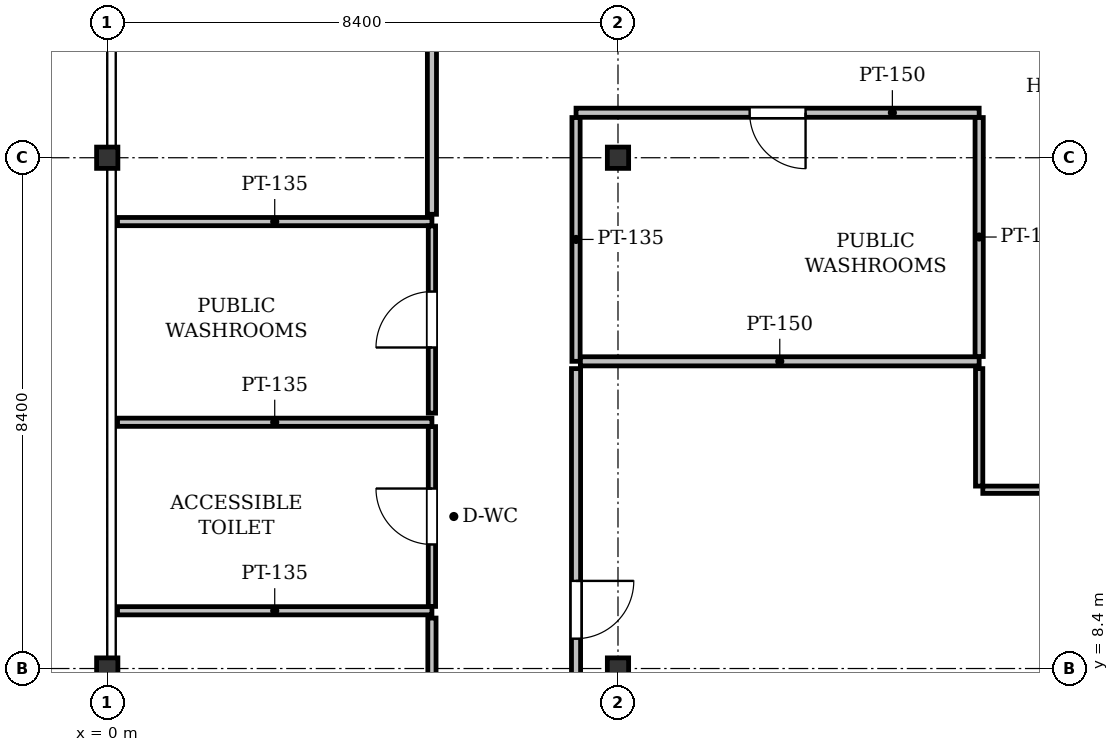
"""IFC4 building model, lengths in metres.
Left out: names, types, materials, properties, quantities, classifications, styles, units other than length and angle.
Written with IfcOpenShell. Run it as: python <this file> out.ifc"""

import sys

from ifc_helpers import new_model, si_unit, direction, frame, frame_2d, origin, origin_2d, place, context, subcontext, project, spatial, rectangle, i_section, extrude, element, fill, save


model = new_model("IFC4")
c1 = context("Model", 3, precision=1e-05, world=origin(), true_north=direction((0.0, 1.0)))
c2 = subcontext(c1, "Body", "Model", "MODEL_VIEW")
j1 = project(units=[si_unit("LENGTHUNIT", "METRE"), si_unit("PLANEANGLEUNIT", "RADIAN")], contexts=[c1])
p1 = place(None, origin())
s1 = spatial("IfcSite", under=j1, at=p1, CompositionType="ELEMENT")
p2 = place(p1, origin())
s2 = spatial("IfcBuilding", under=s1, at=p2, CompositionType="ELEMENT")
p3 = place(p2, frame((0.0, 0.0, 237.0)))
s3 = spatial("IfcBuildingStorey", under=s2, at=p3, CompositionType="ELEMENT", Elevation=237.0)
for number, where, z_axis, x_axis in (
    (1, (0.0, 8.4, 0.0), (0.0, 0.0, 1.0), (1.0, 0.0, 0.0)),
    (2, (0.0, 16.8, 0.0), (0.0, 0.0, 1.0), (1.0, 0.0, 0.0)),
    (3, (8.4, 8.4, 0.0), (0.0, 0.0, 1.0), (1.0, 0.0, 0.0)),
    (4, (8.4, 16.8, 0.0), (0.0, 0.0, 1.0), (1.0, 0.0, 0.0)),
):
    element("IfcColumn", number, at=place(p3, frame(where, z_axis=z_axis, x_axis=x_axis)), inside=s3, PredefinedType="COLUMN", context=c2, shape_type="SweptSolid", body=[
        extrude(i_section(OverallWidth=0.35, OverallDepth=0.35, WebThickness=0.02, FlangeThickness=0.032, at=origin_2d()), origin(), (0.0, 0.0, 1.0), 4.1),
    ])
for number, where, z_axis, x_axis in (
    (5, (5.34, 12.45, 0.0), (0.0, 0.0, 1.0), (-1.0, 0.0, 0.0)),
    (6, (0.169, 9.35, 0.0), (0.0, 0.0, 1.0), (1.0, 0.0, 0.0)),
):
    element("IfcWall", number, at=place(p3, frame(where, z_axis=z_axis, x_axis=x_axis)), inside=s3, PredefinedType="PARTITIONING", context=c2, shape_type="SweptSolid", body=[
        extrude(rectangle(XDim=5.171, YDim=0.135, at=frame_2d((2.585, 0.0))), origin(), (0.0, 0.0, 1.0), 3.518),
    ])
p4 = place(p3, frame((5.34, 9.421, 0.0), z_axis=(0.0, 0.0, 1.0), x_axis=(0.0, 1.0, 0.0)))
e7 = element("IfcWall", 7, at=p4, inside=s3, PredefinedType="PARTITIONING", context=c2, shape_type="SweptSolid", body=[
    extrude(rectangle(XDim=2.957, YDim=0.12, at=frame_2d((1.479, 0.0))), origin(), (0.0, 0.0, 1.0), 3.825),
])
p5 = place(p4, frame((1.019, 0.0, 0.0)))
e8 = element("IfcOpeningElement", 8, at=p5, cuts=e7, PredefinedType="OPENING", context=c2, shape_type="SweptSolid", body=[
    extrude(rectangle(XDim=0.92, YDim=2.1, at=frame_2d((0.46, 1.05))), frame((0.0, 0.07, 0.0), z_axis=(0.0, -1.0, 0.0), x_axis=(1.0, 0.0, 0.0)), (0.0, 0.0, 1.0), 0.14),
])
p6 = place(p3, frame((5.34, 15.75, 0.0), z_axis=(0.0, 0.0, 1.0), x_axis=(-1.0, 0.0, 0.0)))
e9 = element("IfcWall", 9, at=p6, inside=s3, PredefinedType="PARTITIONING", context=c2, shape_type="SweptSolid", body=[
    extrude(rectangle(XDim=5.171, YDim=0.135, at=frame_2d((2.585, 0.0))), origin(), (0.0, 0.0, 1.0), 3.518),
])
p7 = place(p3, frame((5.34, 12.6, 0.0), z_axis=(0.0, 0.0, 1.0), x_axis=(0.0, 1.0, 0.0)))
e10 = element("IfcWall", 10, at=p7, inside=s3, PredefinedType="PARTITIONING", context=c2, shape_type="SweptSolid", body=[
    extrude(rectangle(XDim=3.078, YDim=0.12, at=frame_2d((1.539, 0.0))), origin(), (0.0, 0.0, 1.0), 3.825),
])
p8 = place(p7, frame((1.079, 0.0, 0.0)))
e11 = element("IfcOpeningElement", 11, at=p8, cuts=e10, PredefinedType="OPENING", context=c2, shape_type="SweptSolid", body=[
    extrude(rectangle(XDim=0.92, YDim=2.1, at=frame_2d((0.46, 1.05))), frame((0.0, 0.07, 0.0), z_axis=(0.0, -1.0, 0.0), x_axis=(1.0, 0.0, 0.0)), (0.0, 0.0, 1.0), 0.14),
])
p9 = place(p3, frame((14.34, 17.54, 0.0), z_axis=(0.0, 0.0, 1.0), x_axis=(-1.0, 0.0, 0.0)))
e12 = element("IfcWall", 12, at=p9, inside=s3, PredefinedType="PARTITIONING", context=c2, shape_type="SweptSolid", body=[
    extrude(rectangle(XDim=6.63, YDim=0.15, at=frame_2d((3.315, 0.0))), origin(), (0.0, 0.0, 1.0), 3.371),
])
p10 = place(p9, frame((2.855, 0.0, 0.0)))
e13 = element("IfcOpeningElement", 13, at=p10, cuts=e12, PredefinedType="OPENING", context=c2, shape_type="SweptSolid", body=[
    extrude(rectangle(XDim=0.92, YDim=2.1, at=frame_2d((0.46, 1.05))), frame((0.0, 0.085, 0.0), z_axis=(0.0, -1.0, 0.0), x_axis=(1.0, 0.0, 0.0)), (0.0, 0.0, 1.0), 0.17),
])
p11 = place(p3, frame((7.71, 17.461, 0.0), z_axis=(0.0, 0.0, 1.0), x_axis=(0.0, -1.0, 0.0)))
e14 = element("IfcWall", 14, at=p11, inside=s3, PredefinedType="PARTITIONING", context=c2, shape_type="SweptSolid", body=[
    extrude(rectangle(XDim=4.009, YDim=0.135, at=frame_2d((2.004, 0.0))), origin(), (0.0, 0.0, 1.0), 3.365),
])
p12 = place(p3, frame((7.781, 13.452, 0.0), z_axis=(0.0, 0.0, 1.0), x_axis=(1.0, 0.0, 0.0)))
e15 = element("IfcWall", 15, at=p12, inside=s3, PredefinedType="PARTITIONING", context=c2, shape_type="SweptSolid", body=[
    extrude(rectangle(XDim=6.559, YDim=0.15, at=frame_2d((3.279, 0.0))), origin(), (0.0, 0.0, 1.0), 3.371),
])
p13 = place(p3, frame((14.34, 13.531, 0.0), z_axis=(0.0, 0.0, 1.0), x_axis=(0.0, 1.0, 0.0)))
e16 = element("IfcWall", 16, at=p13, inside=s3, PredefinedType="PARTITIONING", context=c2, shape_type="SweptSolid", body=[
    extrude(rectangle(XDim=3.93, YDim=0.135, at=frame_2d((1.965, 0.0))), origin(), (0.0, 0.0, 1.0), 3.365),
])
p14 = place(p3, frame((5.34, 15.87, 0.0), z_axis=(0.0, 0.0, 1.0), x_axis=(0.0, 1.0, 0.0)))
e17 = element("IfcWall", 17, at=p14, inside=s3, PredefinedType="PARTITIONING", context=c2, shape_type="SweptSolid", body=[
    extrude(rectangle(XDim=18.56, YDim=0.15, at=frame_2d((9.28, 0.0))), origin(), (0.0, 0.0, 1.0), 3.365),
])
p15 = place(p14, frame((8.805, 0.0, 0.0)))
e18 = element("IfcOpeningElement", 18, at=p15, cuts=e17, PredefinedType="OPENING", context=c2, shape_type="SweptSolid", body=[
    extrude(rectangle(XDim=0.95, YDim=2.15, at=frame_2d((0.475, 1.075))), frame((0.0, 0.085, 0.0), z_axis=(0.0, -1.0, 0.0), x_axis=(1.0, 0.0, 0.0)), (0.0, 0.0, 1.0), 0.17),
])
p16 = place(p3, frame((16.571, 11.34, 0.0), z_axis=(0.0, 0.0, 1.0), x_axis=(-1.0, 0.0, 0.0)))
e19 = element("IfcWall", 19, at=p16, inside=s3, PredefinedType="PARTITIONING", context=c2, shape_type="SweptSolid", body=[
    extrude(rectangle(XDim=2.171, YDim=0.12, at=frame_2d((1.085, 0.0))), origin(), (0.0, 0.0, 1.0), 3.825),
])
p17 = place(p3, frame((14.34, 11.4, 0.0), z_axis=(0.0, 0.0, 1.0), x_axis=(0.0, 1.0, 0.0)))
e20 = element("IfcWall", 20, at=p17, inside=s3, PredefinedType="PARTITIONING", context=c2, shape_type="SweptSolid", body=[
    extrude(rectangle(XDim=1.932, YDim=0.12, at=frame_2d((0.966, 0.0))), origin(), (0.0, 0.0, 1.0), 3.825),
])
p18 = place(p3, frame((7.71, 13.332, 0.0), z_axis=(0.0, 0.0, 1.0), x_axis=(0.0, -1.0, 0.0)))
e21 = element("IfcWall", 21, at=p18, inside=s3, PredefinedType="PARTITIONING", context=c2, shape_type="SweptSolid", body=[
    extrude(rectangle(XDim=7.932, YDim=0.15, at=frame_2d((3.966, 0.0))), origin(), (0.0, 0.0, 1.0), 3.365),
])
p19 = place(p18, frame((3.491, 0.0, 0.0)))
e22 = element("IfcOpeningElement", 22, at=p19, cuts=e21, PredefinedType="OPENING", context=c2, shape_type="SweptSolid", body=[
    extrude(rectangle(XDim=0.95, YDim=2.15, at=frame_2d((0.475, 1.075))), frame((0.0, 0.085, 0.0), z_axis=(0.0, -1.0, 0.0), x_axis=(1.0, 0.0, 0.0)), (0.0, 0.0, 1.0), 0.17),
])
p20 = place(p3, frame((5.34, 5.4, 0.0), z_axis=(0.0, 0.0, 1.0), x_axis=(0.0, 1.0, 0.0)))
e23 = element("IfcWall", 23, at=p20, inside=s3, PredefinedType="PARTITIONING", context=c2, shape_type="SweptSolid", body=[
    extrude(rectangle(XDim=3.83, YDim=0.135, at=frame_2d((1.915, 0.0))), origin(), (0.0, 0.0, 1.0), 3.365),
])
p21 = place(p5, origin())
e24 = element("IfcDoor", 24, at=p21, inside=s3, OperationType="SINGLE_SWING_RIGHT", PredefinedType="DOOR", context=c2, shape_type="SweptSolid", body=[
    extrude(rectangle(XDim=0.92, YDim=2.1, at=frame_2d((0.46, 1.05))), frame((0.0, 0.025, 0.0), z_axis=(0.0, -1.0, 0.0), x_axis=(1.0, 0.0, 0.0)), (0.0, 0.0, 1.0), 0.05),
])
fill(e8, e24)
p22 = place(p8, origin())
e25 = element("IfcDoor", 25, at=p22, inside=s3, OperationType="SINGLE_SWING_LEFT", PredefinedType="DOOR", context=c2, shape_type="SweptSolid", body=[
    extrude(rectangle(XDim=0.92, YDim=2.1, at=frame_2d((0.46, 1.05))), frame((0.0, 0.025, 0.0), z_axis=(0.0, -1.0, 0.0), x_axis=(1.0, 0.0, 0.0)), (0.0, 0.0, 1.0), 0.05),
])
fill(e11, e25)
p23 = place(p10, origin())
e26 = element("IfcDoor", 26, at=p23, inside=s3, OperationType="SINGLE_SWING_LEFT", PredefinedType="DOOR", context=c2, shape_type="SweptSolid", body=[
    extrude(rectangle(XDim=0.92, YDim=2.1, at=frame_2d((0.46, 1.05))), frame((0.0, 0.025, 0.0), z_axis=(0.0, -1.0, 0.0), x_axis=(1.0, 0.0, 0.0)), (0.0, 0.0, 1.0), 0.05),
])
fill(e13, e26)
p24 = place(p19, origin())
e27 = element("IfcDoor", 27, at=p24, inside=s3, OperationType="SINGLE_SWING_LEFT", PredefinedType="DOOR", context=c2, shape_type="SweptSolid", body=[
    extrude(rectangle(XDim=0.95, YDim=2.15, at=frame_2d((0.475, 1.075))), frame((0.0, 0.025, 0.0), z_axis=(0.0, -1.0, 0.0), x_axis=(1.0, 0.0, 0.0)), (0.0, 0.0, 1.0), 0.05),
])
fill(e22, e27)
save(model, sys.argv[1])
